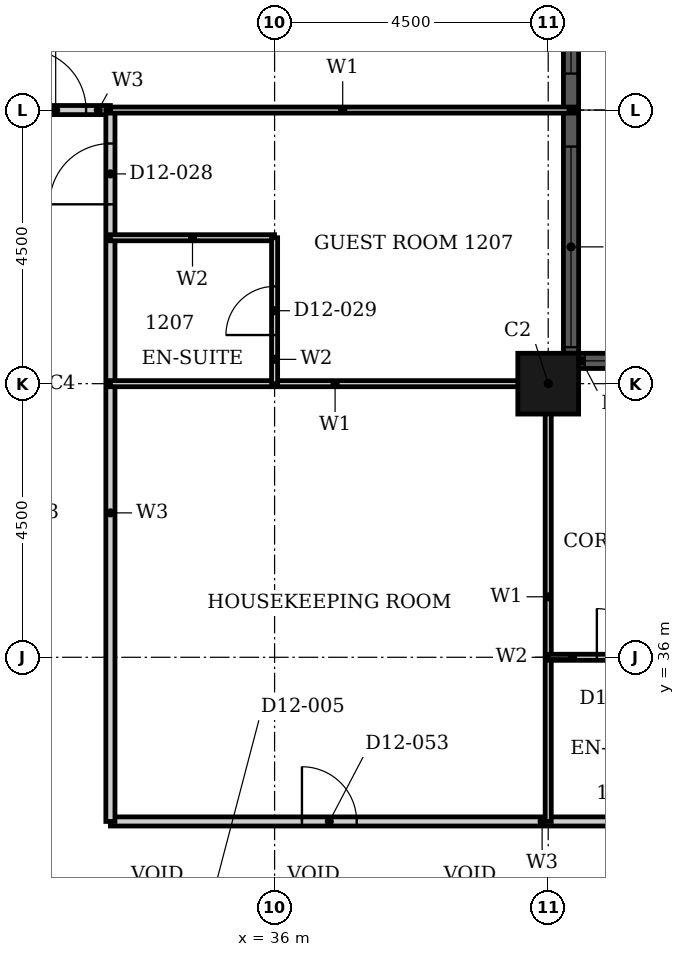
"""IFC4 building model, lengths in metres.
Left out: names, types, materials, properties, quantities, classifications, styles, units other than length and angle.
Written with IfcOpenShell. Run it as: python <this file> out.ifc"""

import sys

from ifc_helpers import new_model, si_unit, direction, frame, frame_2d, origin, origin_2d, place, context, subcontext, project, spatial, rectangle, hollow_rectangle, extrude, element, fill, save


model = new_model("IFC4")
c1 = context("Model", 3, precision=1e-05, world=origin(), true_north=direction((0.0, 1.0)))
c2 = subcontext(c1, "Body", "Model", "MODEL_VIEW")
j1 = project(units=[si_unit("LENGTHUNIT", "METRE"), si_unit("PLANEANGLEUNIT", "RADIAN")], contexts=[c1])
p1 = place(None, origin())
s1 = spatial("IfcSite", under=j1, at=p1, CompositionType="ELEMENT")
p2 = place(p1, origin())
s2 = spatial("IfcBuilding", under=s1, at=p2, CompositionType="ELEMENT")
p3 = place(p2, frame((0.0, 0.0, 56.4)))
s3 = spatial("IfcBuildingStorey", under=s2, at=p3, CompositionType="ELEMENT", Elevation=56.4)
p4 = place(p3, frame((40.5, 40.5, 0.0), z_axis=(0.0, 0.0, 1.0), x_axis=(1.0, 0.0, 0.0)))
e1 = element("IfcColumn", 1, at=p4, inside=s3, PredefinedType="COLUMN", context=c2, shape_type="SweptSolid", body=[
    extrude(hollow_rectangle(XDim=1.0, YDim=1.0, WallThickness=0.032, at=origin_2d()), origin(), (0.0, 0.0, 1.0), 3.6),
])
p5 = place(p3, frame((44.5, 40.875, 0.0), z_axis=(0.0, 0.0, 1.0), x_axis=(-1.0, 0.0, 0.0)))
e2 = element("IfcWall", 2, at=p5, inside=s3, PredefinedType="SOLIDWALL", context=c2, shape_type="SweptSolid", body=[
    extrude(rectangle(XDim=3.5, YDim=0.25, at=frame_2d((1.75, 0.0))), origin(), (0.0, 0.0, 1.0), 3.6),
])
p6 = place(p5, frame((0.1, 0.0, 0.9)))
e3 = element("IfcOpeningElement", 3, at=p6, cuts=e2, PredefinedType="OPENING", context=c2, shape_type="SweptSolid", body=[
    extrude(rectangle(XDim=3.3, YDim=2.08, at=frame_2d((1.65, 1.04))), frame((0.0, 0.135, 0.0), z_axis=(0.0, -1.0, 0.0), x_axis=(1.0, 0.0, 0.0)), (0.0, 0.0, 1.0), 0.27),
])
p7 = place(p3, frame((40.875, 41.0, 0.0), z_axis=(0.0, 0.0, 1.0), x_axis=(0.0, 1.0, 0.0)))
e4 = element("IfcWall", 4, at=p7, inside=s3, PredefinedType="SOLIDWALL", context=c2, shape_type="SweptSolid", body=[
    extrude(rectangle(XDim=8.0, YDim=0.25, at=frame_2d((4.0, 0.0))), origin(), (0.0, 0.0, 1.0), 3.6),
])
p8 = place(p7, frame((0.1, 0.0, 0.9)))
e5 = element("IfcOpeningElement", 5, at=p8, cuts=e4, PredefinedType="OPENING", context=c2, shape_type="SweptSolid", body=[
    extrude(rectangle(XDim=3.3, YDim=2.08, at=frame_2d((1.65, 1.04))), frame((0.0, 0.135, 0.0), z_axis=(0.0, -1.0, 0.0), x_axis=(1.0, 0.0, 0.0)), (0.0, 0.0, 1.0), 0.27),
])
p9 = place(p7, frame((4.6, 0.0, 0.9)))
e6 = element("IfcOpeningElement", 6, at=p9, cuts=e4, PredefinedType="OPENING", context=c2, shape_type="SweptSolid", body=[
    extrude(rectangle(XDim=3.3, YDim=2.08, at=frame_2d((1.65, 1.04))), frame((0.0, 0.135, 0.0), z_axis=(0.0, -1.0, 0.0), x_axis=(1.0, 0.0, 0.0)), (0.0, 0.0, 1.0), 0.27),
])
p10 = place(p3, frame((33.3, 33.3, 0.0), z_axis=(0.0, 0.0, 1.0), x_axis=(1.0, 0.0, 0.0)))
e7 = element("IfcWall", 7, at=p10, inside=s3, PredefinedType="PARTITIONING", context=c2, shape_type="SweptSolid", body=[
    extrude(rectangle(XDim=13.5, YDim=0.15, at=frame_2d((6.75, 0.0))), origin(), (0.0, 0.0, 1.0), 3.3),
])
p11 = place(p10, frame((10.15, 0.0, 0.0)))
e8 = element("IfcOpeningElement", 8, at=p11, cuts=e7, PredefinedType="OPENING", context=c2, shape_type="SweptSolid", body=[
    extrude(rectangle(XDim=1.0, YDim=2.1, at=frame_2d((0.5, 1.05))), frame((0.0, 0.085, 0.0), z_axis=(0.0, -1.0, 0.0), x_axis=(1.0, 0.0, 0.0)), (0.0, 0.0, 1.0), 0.17),
])
p12 = place(p10, frame((3.15, 0.0, 0.0)))
e9 = element("IfcOpeningElement", 9, at=p12, cuts=e7, PredefinedType="OPENING", context=c2, shape_type="SweptSolid", body=[
    extrude(rectangle(XDim=0.9, YDim=2.1, at=frame_2d((0.45, 1.05))), frame((0.0, 0.085, 0.0), z_axis=(0.0, -1.0, 0.0), x_axis=(1.0, 0.0, 0.0)), (0.0, 0.0, 1.0), 0.17),
])
p13 = place(p3, frame((31.5, 45.0, 0.0), z_axis=(0.0, 0.0, 1.0), x_axis=(1.0, 0.0, 0.0)))
e10 = element("IfcWall", 10, at=p13, inside=s3, PredefinedType="PARTITIONING", context=c2, shape_type="SweptSolid", body=[
    extrude(rectangle(XDim=1.8, YDim=0.15, at=frame_2d((0.9, 0.0))), origin(), (0.0, 0.0, 1.0), 3.3),
])
p14 = place(p13, frame((0.4, 0.0, 0.0)))
e11 = element("IfcOpeningElement", 11, at=p14, cuts=e10, PredefinedType="OPENING", context=c2, shape_type="SweptSolid", body=[
    extrude(rectangle(XDim=1.0, YDim=2.1, at=frame_2d((0.5, 1.05))), frame((0.0, 0.085, 0.0), z_axis=(0.0, -1.0, 0.0), x_axis=(1.0, 0.0, 0.0)), (0.0, 0.0, 1.0), 0.17),
])
p15 = place(p3, frame((33.3, 33.3, 0.0), z_axis=(0.0, 0.0, 1.0), x_axis=(0.0, 1.0, 0.0)))
e12 = element("IfcWall", 12, at=p15, inside=s3, PredefinedType="PARTITIONING", context=c2, shape_type="SweptSolid", body=[
    extrude(rectangle(XDim=11.7, YDim=0.15, at=frame_2d((5.85, 0.0))), origin(), (0.0, 0.0, 1.0), 3.3),
])
p16 = place(p15, frame((10.15, 0.0, 0.0)))
e13 = element("IfcOpeningElement", 13, at=p16, cuts=e12, PredefinedType="OPENING", context=c2, shape_type="SweptSolid", body=[
    extrude(rectangle(XDim=1.0, YDim=2.1, at=frame_2d((0.5, 1.05))), frame((0.0, 0.085, 0.0), z_axis=(0.0, -1.0, 0.0), x_axis=(1.0, 0.0, 0.0)), (0.0, 0.0, 1.0), 0.17),
])
p17 = place(p3, frame((33.3, 40.5, 0.0), z_axis=(0.0, 0.0, 1.0), x_axis=(1.0, 0.0, 0.0)))
e14 = element("IfcWall", 14, at=p17, inside=s3, PredefinedType="PARTITIONING", context=c2, shape_type="SweptSolid", body=[
    extrude(rectangle(XDim=7.39, YDim=0.1, at=frame_2d((3.695, 0.0))), origin(), (0.0, 0.0, 1.0), 2.38),
])
p18 = place(p3, frame((33.3, 45.0, 0.0), z_axis=(0.0, 0.0, 1.0), x_axis=(1.0, 0.0, 0.0)))
e15 = element("IfcWall", 15, at=p18, inside=s3, PredefinedType="PARTITIONING", context=c2, shape_type="SweptSolid", body=[
    extrude(rectangle(XDim=7.64, YDim=0.1, at=frame_2d((3.82, 0.0))), origin(), (0.0, 0.0, 1.0), 3.3),
])
p19 = place(p3, frame((40.5, 33.3, 0.0), z_axis=(0.0, 0.0, 1.0), x_axis=(0.0, 1.0, 0.0)))
e16 = element("IfcWall", 16, at=p19, inside=s3, PredefinedType="PARTITIONING", context=c2, shape_type="SweptSolid", body=[
    extrude(rectangle(XDim=7.39, YDim=0.1, at=frame_2d((3.695, 0.0))), origin(), (0.0, 0.0, 1.0), 3.3),
])
p20 = place(p3, frame((40.5, 36.0, 0.0), z_axis=(0.0, 0.0, 1.0), x_axis=(1.0, 0.0, 0.0)))
e17 = element("IfcWall", 17, at=p20, inside=s3, PredefinedType="PARTITIONING", context=c2, shape_type="SweptSolid", body=[
    extrude(rectangle(XDim=2.4, YDim=0.1, at=frame_2d((1.2, 0.0))), origin(), (0.0, 0.0, 1.0), 3.3),
])
p21 = place(p20, frame((0.8, 0.0, 0.0)))
e18 = element("IfcOpeningElement", 18, at=p21, cuts=e17, PredefinedType="OPENING", context=c2, shape_type="SweptSolid", body=[
    extrude(rectangle(XDim=0.8, YDim=2.1, at=frame_2d((0.4, 1.05))), frame((0.0, 0.06, 0.0), z_axis=(0.0, -1.0, 0.0), x_axis=(1.0, 0.0, 0.0)), (0.0, 0.0, 1.0), 0.12),
])
p22 = place(p3, frame((33.3, 42.9, 0.0), z_axis=(0.0, 0.0, 1.0), x_axis=(1.0, 0.0, 0.0)))
e19 = element("IfcWall", 19, at=p22, inside=s3, PredefinedType="PARTITIONING", context=c2, shape_type="SweptSolid", body=[
    extrude(rectangle(XDim=2.7, YDim=0.1, at=frame_2d((1.35, 0.0))), origin(), (0.0, 0.0, 1.0), 3.3),
])
p23 = place(p3, frame((36.0, 40.5, 0.0), z_axis=(0.0, 0.0, 1.0), x_axis=(0.0, 1.0, 0.0)))
e20 = element("IfcWall", 20, at=p23, inside=s3, PredefinedType="PARTITIONING", context=c2, shape_type="SweptSolid", body=[
    extrude(rectangle(XDim=2.4, YDim=0.1, at=frame_2d((1.2, 0.0))), origin(), (0.0, 0.0, 1.0), 2.58),
])
p24 = place(p23, frame((0.8, 0.0, 0.0)))
e21 = element("IfcOpeningElement", 21, at=p24, cuts=e20, PredefinedType="OPENING", context=c2, shape_type="SweptSolid", body=[
    extrude(rectangle(XDim=0.8, YDim=2.1, at=frame_2d((0.4, 1.05))), frame((0.0, 0.06, 0.0), z_axis=(0.0, -1.0, 0.0), x_axis=(1.0, 0.0, 0.0)), (0.0, 0.0, 1.0), 0.12),
])
p25 = place(p6, origin())
e22 = element("IfcWindow", 22, at=p25, inside=s3, PartitioningType="SINGLE_PANEL", PredefinedType="WINDOW", context=c2, shape_type="SweptSolid", body=[
    extrude(rectangle(XDim=3.3, YDim=2.08, at=frame_2d((1.65, 1.04))), frame((0.0, 0.03, 0.0), z_axis=(0.0, -1.0, 0.0), x_axis=(1.0, 0.0, 0.0)), (0.0, 0.0, 1.0), 0.06),
])
fill(e3, e22)
p26 = place(p8, origin())
e23 = element("IfcWindow", 23, at=p26, inside=s3, PartitioningType="SINGLE_PANEL", PredefinedType="WINDOW", context=c2, shape_type="SweptSolid", body=[
    extrude(rectangle(XDim=3.3, YDim=2.08, at=frame_2d((1.65, 1.04))), frame((0.0, 0.03, 0.0), z_axis=(0.0, -1.0, 0.0), x_axis=(1.0, 0.0, 0.0)), (0.0, 0.0, 1.0), 0.06),
])
fill(e5, e23)
p27 = place(p9, origin())
e24 = element("IfcWindow", 24, at=p27, inside=s3, PartitioningType="SINGLE_PANEL", PredefinedType="WINDOW", context=c2, shape_type="SweptSolid", body=[
    extrude(rectangle(XDim=3.3, YDim=2.08, at=frame_2d((1.65, 1.04))), frame((0.0, 0.03, 0.0), z_axis=(0.0, -1.0, 0.0), x_axis=(1.0, 0.0, 0.0)), (0.0, 0.0, 1.0), 0.06),
])
fill(e6, e24)
p28 = place(p16, origin())
e25 = element("IfcDoor", 25, at=p28, inside=s3, OperationType="SINGLE_SWING_RIGHT", PredefinedType="DOOR", context=c2, shape_type="SweptSolid", body=[
    extrude(rectangle(XDim=1.0, YDim=2.1, at=frame_2d((0.5, 1.05))), frame((0.0, 0.025, 0.0), z_axis=(0.0, -1.0, 0.0), x_axis=(1.0, 0.0, 0.0)), (0.0, 0.0, 1.0), 0.05),
])
fill(e13, e25)
p29 = place(p24, origin())
e26 = element("IfcDoor", 26, at=p29, inside=s3, OperationType="SINGLE_SWING_RIGHT", PredefinedType="DOOR", context=c2, shape_type="SweptSolid", body=[
    extrude(rectangle(XDim=0.8, YDim=2.1, at=frame_2d((0.4, 1.05))), frame((0.0, 0.025, 0.0), z_axis=(0.0, -1.0, 0.0), x_axis=(1.0, 0.0, 0.0)), (0.0, 0.0, 1.0), 0.05),
])
fill(e21, e26)
p30 = place(p14, origin())
e27 = element("IfcDoor", 27, at=p30, inside=s3, OperationType="SINGLE_SWING_LEFT", PredefinedType="DOOR", context=c2, shape_type="SweptSolid", body=[
    extrude(rectangle(XDim=1.0, YDim=2.1, at=frame_2d((0.5, 1.05))), frame((0.0, 0.025, 0.0), z_axis=(0.0, -1.0, 0.0), x_axis=(1.0, 0.0, 0.0)), (0.0, 0.0, 1.0), 0.05),
])
fill(e11, e27)
p31 = place(p21, origin())
e28 = element("IfcDoor", 28, at=p31, inside=s3, OperationType="SINGLE_SWING_LEFT", PredefinedType="DOOR", context=c2, shape_type="SweptSolid", body=[
    extrude(rectangle(XDim=0.8, YDim=2.1, at=frame_2d((0.4, 1.05))), frame((0.0, 0.025, 0.0), z_axis=(0.0, -1.0, 0.0), x_axis=(1.0, 0.0, 0.0)), (0.0, 0.0, 1.0), 0.05),
])
fill(e18, e28)
p32 = place(p12, origin())
e29 = element("IfcDoor", 29, at=p32, inside=s3, OperationType="SINGLE_SWING_RIGHT", PredefinedType="DOOR", context=c2, shape_type="SweptSolid", body=[
    extrude(rectangle(XDim=0.9, YDim=2.1, at=frame_2d((0.45, 1.05))), frame((0.0, 0.025, 0.0), z_axis=(0.0, -1.0, 0.0), x_axis=(1.0, 0.0, 0.0)), (0.0, 0.0, 1.0), 0.05),
])
fill(e9, e29)
save(model, sys.argv[1])
